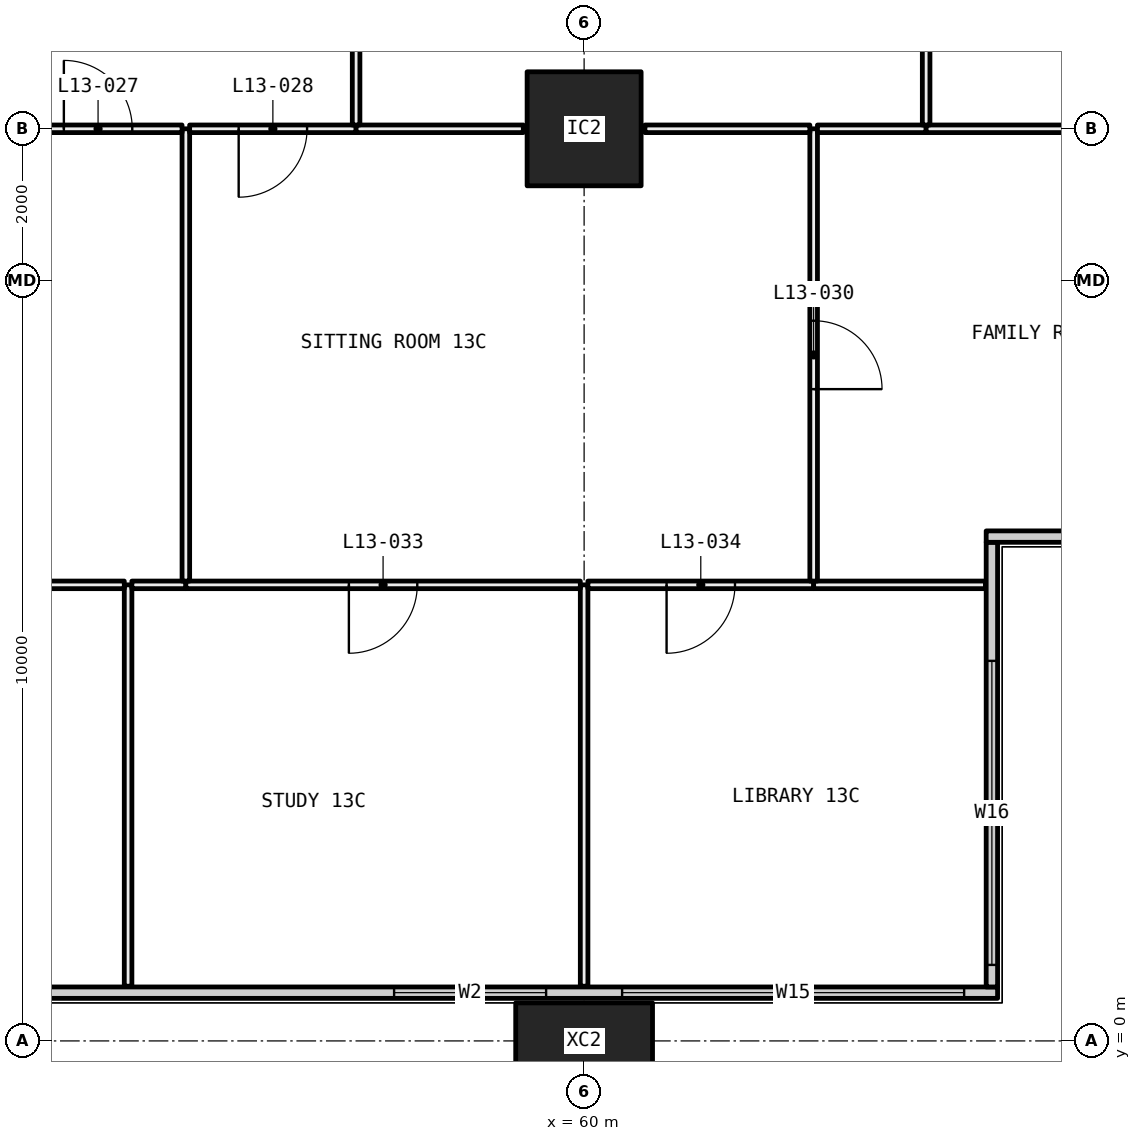
"""IFC4 building model, lengths in metres.
Left out: names, types, materials, properties, quantities, classifications, styles, units other than length and angle.
Written with IfcOpenShell. Run it as: python <this file> out.ifc"""

import sys

from ifc_helpers import new_model, si_unit, direction, frame, frame_2d, origin, origin_2d, place, context, subcontext, project, spatial, rectangle, hollow_rectangle, extrude, element, fill, save


model = new_model("IFC4")
c1 = context("Model", 3, precision=1e-05, world=origin(), true_north=direction((0.0, 1.0)))
c2 = subcontext(c1, "Body", "Model", "MODEL_VIEW")
j1 = project(units=[si_unit("LENGTHUNIT", "METRE"), si_unit("PLANEANGLEUNIT", "RADIAN")], contexts=[c1])
p1 = place(None, origin())
s1 = spatial("IfcSite", under=j1, at=p1, CompositionType="ELEMENT")
p2 = place(p1, origin())
s2 = spatial("IfcBuilding", under=s1, at=p2, CompositionType="ELEMENT")
p3 = place(p2, frame((0.0, 0.0, 57.6)))
s3 = spatial("IfcBuildingStorey", under=s2, at=p3, CompositionType="ELEMENT", Elevation=57.6)
p4 = place(p3, frame((60.0, 0.0, -0.4), z_axis=(0.0, 0.0, 1.0), x_axis=(1.0, 0.0, 0.0)))
e1 = element("IfcColumn", 1, at=p4, inside=s3, PredefinedType="COLUMN", context=c2, shape_type="SweptSolid", body=[
    extrude(hollow_rectangle(XDim=1.8, YDim=1.0, WallThickness=0.07, at=origin_2d()), origin(), (0.0, 0.0, 1.0), 3.45),
])
p5 = place(p3, frame((60.0, 12.0, 0.0), z_axis=(0.0, 0.0, 1.0), x_axis=(1.0, 0.0, 0.0)))
e2 = element("IfcColumn", 2, at=p5, inside=s3, PredefinedType="COLUMN", context=c2, shape_type="SweptSolid", body=[
    extrude(hollow_rectangle(XDim=1.5, YDim=1.5, WallThickness=0.065, at=origin_2d()), origin(), (0.0, 0.0, 1.0), 3.05),
])
p6 = place(p3, frame((6.56, 0.635, 0.0), z_axis=(0.0, 0.0, 1.0), x_axis=(1.0, 0.0, 0.0)))
e3 = element("IfcWall", 3, at=p6, inside=s3, PredefinedType="ELEMENTEDWALL", context=c2, shape_type="SweptSolid", body=[
    extrude(rectangle(XDim=58.88, YDim=0.15, at=frame_2d((29.44, 0.0))), origin(), (0.0, 0.0, 1.0), 3.05),
])
p7 = place(p6, frame((0.44, 0.0, 0.45)))
e4 = element("IfcOpeningElement", 4, at=p7, cuts=e3, PredefinedType="OPENING", context=c2, shape_type="SweptSolid", body=[
    extrude(rectangle(XDim=4.5, YDim=2.55, at=frame_2d((2.25, 1.275))), frame((0.0, 0.085, 0.0), z_axis=(0.0, -1.0, 0.0), x_axis=(1.0, 0.0, 0.0)), (0.0, 0.0, 1.0), 0.17),
])
p8 = place(p6, frame((5.94, 0.0, 0.45)))
e5 = element("IfcOpeningElement", 5, at=p8, cuts=e3, PredefinedType="OPENING", context=c2, shape_type="SweptSolid", body=[
    extrude(rectangle(XDim=3.25, YDim=2.55, at=frame_2d((1.625, 1.275))), frame((0.0, 0.085, 0.0), z_axis=(0.0, -1.0, 0.0), x_axis=(1.0, 0.0, 0.0)), (0.0, 0.0, 1.0), 0.17),
])
p9 = place(p6, frame((13.69, 0.0, 0.45)))
e6 = element("IfcOpeningElement", 6, at=p9, cuts=e3, PredefinedType="OPENING", context=c2, shape_type="SweptSolid", body=[
    extrude(rectangle(XDim=3.25, YDim=2.55, at=frame_2d((1.625, 1.275))), frame((0.0, 0.085, 0.0), z_axis=(0.0, -1.0, 0.0), x_axis=(1.0, 0.0, 0.0)), (0.0, 0.0, 1.0), 0.17),
])
p10 = place(p6, frame((17.94, 0.0, 0.45)))
e7 = element("IfcOpeningElement", 7, at=p10, cuts=e3, PredefinedType="OPENING", context=c2, shape_type="SweptSolid", body=[
    extrude(rectangle(XDim=3.25, YDim=2.55, at=frame_2d((1.625, 1.275))), frame((0.0, 0.085, 0.0), z_axis=(0.0, -1.0, 0.0), x_axis=(1.0, 0.0, 0.0)), (0.0, 0.0, 1.0), 0.17),
])
p11 = place(p6, frame((26.94, 0.0, 0.45)))
e8 = element("IfcOpeningElement", 8, at=p11, cuts=e3, PredefinedType="OPENING", context=c2, shape_type="SweptSolid", body=[
    extrude(rectangle(XDim=2.0, YDim=2.55, at=frame_2d((1.0, 1.275))), frame((0.0, 0.085, 0.0), z_axis=(0.0, -1.0, 0.0), x_axis=(1.0, 0.0, 0.0)), (0.0, 0.0, 1.0), 0.17),
])
p12 = place(p6, frame((29.94, 0.0, 0.45)))
e9 = element("IfcOpeningElement", 9, at=p12, cuts=e3, PredefinedType="OPENING", context=c2, shape_type="SweptSolid", body=[
    extrude(rectangle(XDim=3.25, YDim=2.55, at=frame_2d((1.625, 1.275))), frame((0.0, 0.085, 0.0), z_axis=(0.0, -1.0, 0.0), x_axis=(1.0, 0.0, 0.0)), (0.0, 0.0, 1.0), 0.17),
])
p13 = place(p6, frame((37.69, 0.0, 0.45)))
e10 = element("IfcOpeningElement", 10, at=p13, cuts=e3, PredefinedType="OPENING", context=c2, shape_type="SweptSolid", body=[
    extrude(rectangle(XDim=3.25, YDim=2.55, at=frame_2d((1.625, 1.275))), frame((0.0, 0.085, 0.0), z_axis=(0.0, -1.0, 0.0), x_axis=(1.0, 0.0, 0.0)), (0.0, 0.0, 1.0), 0.17),
])
p14 = place(p6, frame((41.94, 0.0, 0.45)))
e11 = element("IfcOpeningElement", 11, at=p14, cuts=e3, PredefinedType="OPENING", context=c2, shape_type="SweptSolid", body=[
    extrude(rectangle(XDim=3.25, YDim=2.55, at=frame_2d((1.625, 1.275))), frame((0.0, 0.085, 0.0), z_axis=(0.0, -1.0, 0.0), x_axis=(1.0, 0.0, 0.0)), (0.0, 0.0, 1.0), 0.17),
])
p15 = place(p6, frame((50.94, 0.0, 0.45)))
e12 = element("IfcOpeningElement", 12, at=p15, cuts=e3, PredefinedType="OPENING", context=c2, shape_type="SweptSolid", body=[
    extrude(rectangle(XDim=2.0, YDim=2.55, at=frame_2d((1.0, 1.275))), frame((0.0, 0.085, 0.0), z_axis=(0.0, -1.0, 0.0), x_axis=(1.0, 0.0, 0.0)), (0.0, 0.0, 1.0), 0.17),
])
p16 = place(p6, frame((53.94, 0.0, 0.45)))
e13 = element("IfcOpeningElement", 13, at=p16, cuts=e3, PredefinedType="OPENING", context=c2, shape_type="SweptSolid", body=[
    extrude(rectangle(XDim=4.5, YDim=2.55, at=frame_2d((2.25, 1.275))), frame((0.0, 0.085, 0.0), z_axis=(0.0, -1.0, 0.0), x_axis=(1.0, 0.0, 0.0)), (0.0, 0.0, 1.0), 0.17),
])
p17 = place(p3, frame((65.365, 0.71, 0.0), z_axis=(0.0, 0.0, 1.0), x_axis=(0.0, 1.0, 0.0)))
e14 = element("IfcWall", 14, at=p17, inside=s3, PredefinedType="ELEMENTEDWALL", context=c2, shape_type="SweptSolid", body=[
    extrude(rectangle(XDim=5.85, YDim=0.15, at=frame_2d((2.925, 0.0))), origin(), (0.0, 0.0, 1.0), 3.05),
])
p18 = place(p17, frame((0.29, 0.0, 0.45)))
e15 = element("IfcOpeningElement", 15, at=p18, cuts=e14, PredefinedType="OPENING", context=c2, shape_type="SweptSolid", body=[
    extrude(rectangle(XDim=4.0, YDim=2.55, at=frame_2d((2.0, 1.275))), frame((0.0, 0.085, 0.0), z_axis=(0.0, -1.0, 0.0), x_axis=(1.0, 0.0, 0.0)), (0.0, 0.0, 1.0), 0.17),
])
p19 = place(p3, frame((65.29, 6.635, 0.0), z_axis=(0.0, 0.0, 1.0), x_axis=(1.0, 0.0, 0.0)))
e16 = element("IfcWall", 16, at=p19, inside=s3, PredefinedType="ELEMENTEDWALL", context=c2, shape_type="SweptSolid", body=[
    extrude(rectangle(XDim=6.15, YDim=0.15, at=frame_2d((3.075, 0.0))), origin(), (0.0, 0.0, 1.0), 3.05),
])
p20 = place(p19, frame((1.71, 0.0, 0.45)))
e17 = element("IfcOpeningElement", 17, at=p20, cuts=e16, PredefinedType="OPENING", context=c2, shape_type="SweptSolid", body=[
    extrude(rectangle(XDim=4.0, YDim=2.55, at=frame_2d((2.0, 1.275))), frame((0.0, 0.085, 0.0), z_axis=(0.0, -1.0, 0.0), x_axis=(1.0, 0.0, 0.0)), (0.0, 0.0, 1.0), 0.17),
])
p21 = place(p3, frame((54.0, 0.72, 0.0), z_axis=(0.0, 0.0, 1.0), x_axis=(0.0, 1.0, 0.0)))
e18 = element("IfcWall", 18, at=p21, inside=s3, PredefinedType="PARTITIONING", context=c2, shape_type="SweptSolid", body=[
    extrude(rectangle(XDim=5.28, YDim=0.1, at=frame_2d((2.64, 0.0))), origin(), (0.0, 0.0, 1.0), 3.05),
])
p22 = place(p3, frame((53.95, 6.0, 0.0), z_axis=(0.0, 0.0, 1.0), x_axis=(-1.0, 0.0, 0.0)))
e19 = element("IfcWall", 19, at=p22, inside=s3, PredefinedType="PARTITIONING", context=c2, shape_type="SweptSolid", body=[
    extrude(rectangle(XDim=5.9, YDim=0.1, at=frame_2d((2.95, 0.0))), origin(), (0.0, 0.0, 1.0), 2.45),
])
p23 = place(p22, frame((2.5, 0.0, 0.0)))
e20 = element("IfcOpeningElement", 20, at=p23, cuts=e19, PredefinedType="OPENING", context=c2, shape_type="SweptSolid", body=[
    extrude(rectangle(XDim=0.9, YDim=2.1, at=frame_2d((0.45, 1.05))), frame((0.0, 0.06, 0.0), z_axis=(0.0, -1.0, 0.0), x_axis=(1.0, 0.0, 0.0)), (0.0, 0.0, 1.0), 0.12),
])
p24 = place(p3, frame((60.0, 0.72, 0.0), z_axis=(0.0, 0.0, 1.0), x_axis=(0.0, 1.0, 0.0)))
e21 = element("IfcWall", 21, at=p24, inside=s3, PredefinedType="PARTITIONING", context=c2, shape_type="SweptSolid", body=[
    extrude(rectangle(XDim=5.28, YDim=0.1, at=frame_2d((2.64, 0.0))), origin(), (0.0, 0.0, 1.0), 2.45),
])
p25 = place(p3, frame((54.76, 6.0, 0.0), z_axis=(0.0, 0.0, 1.0), x_axis=(-1.0, 0.0, 0.0)))
e22 = element("IfcWall", 22, at=p25, inside=s3, PredefinedType="PARTITIONING", context=c2, shape_type="SweptSolid", body=[
    extrude(rectangle(XDim=0.71, YDim=0.1, at=frame_2d((0.355, 0.0))), origin(), (0.0, 0.0, 1.0), 3.05),
])
p26 = place(p3, frame((59.95, 6.0, 0.0), z_axis=(0.0, 0.0, 1.0), x_axis=(-1.0, 0.0, 0.0)))
e23 = element("IfcWall", 23, at=p26, inside=s3, PredefinedType="PARTITIONING", context=c2, shape_type="SweptSolid", body=[
    extrude(rectangle(XDim=5.19, YDim=0.1, at=frame_2d((2.595, 0.0))), origin(), (0.0, 0.0, 1.0), 2.45),
])
p27 = place(p26, frame((2.145, 0.0, 0.0)))
e24 = element("IfcOpeningElement", 24, at=p27, cuts=e23, PredefinedType="OPENING", context=c2, shape_type="SweptSolid", body=[
    extrude(rectangle(XDim=0.9, YDim=2.1, at=frame_2d((0.45, 1.05))), frame((0.0, 0.06, 0.0), z_axis=(0.0, -1.0, 0.0), x_axis=(1.0, 0.0, 0.0)), (0.0, 0.0, 1.0), 0.12),
])
p28 = place(p3, frame((63.02, 6.0, 0.0), z_axis=(0.0, 0.0, 1.0), x_axis=(-1.0, 0.0, 0.0)))
e25 = element("IfcWall", 25, at=p28, inside=s3, PredefinedType="PARTITIONING", context=c2, shape_type="SweptSolid", body=[
    extrude(rectangle(XDim=2.97, YDim=0.1, at=frame_2d((1.485, 0.0))), origin(), (0.0, 0.0, 1.0), 2.45),
])
p29 = place(p28, frame((1.035, 0.0, 0.0)))
e26 = element("IfcOpeningElement", 26, at=p29, cuts=e25, PredefinedType="OPENING", context=c2, shape_type="SweptSolid", body=[
    extrude(rectangle(XDim=0.9, YDim=2.1, at=frame_2d((0.45, 1.05))), frame((0.0, 0.06, 0.0), z_axis=(0.0, -1.0, 0.0), x_axis=(1.0, 0.0, 0.0)), (0.0, 0.0, 1.0), 0.12),
])
p30 = place(p3, frame((65.28, 6.0, 0.0), z_axis=(0.0, 0.0, 1.0), x_axis=(-1.0, 0.0, 0.0)))
e27 = element("IfcWall", 27, at=p30, inside=s3, PredefinedType="PARTITIONING", context=c2, shape_type="SweptSolid", body=[
    extrude(rectangle(XDim=2.26, YDim=0.1, at=frame_2d((1.13, 0.0))), origin(), (0.0, 0.0, 1.0), 3.05),
])
p31 = place(p3, frame((54.76, 6.05, 0.0), z_axis=(0.0, 0.0, 1.0), x_axis=(0.0, 1.0, 0.0)))
e28 = element("IfcWall", 28, at=p31, inside=s3, PredefinedType="PARTITIONING", context=c2, shape_type="SweptSolid", body=[
    extrude(rectangle(XDim=5.95, YDim=0.1, at=frame_2d((2.975, 0.0))), origin(), (0.0, 0.0, 1.0), 2.45),
])
p32 = place(p3, frame((54.71, 12.0, 0.0), z_axis=(0.0, 0.0, 1.0), x_axis=(-1.0, 0.0, 0.0)))
e29 = element("IfcWall", 29, at=p32, inside=s3, PredefinedType="PARTITIONING", context=c2, shape_type="SweptSolid", body=[
    extrude(rectangle(XDim=2.21, YDim=0.1, at=frame_2d((1.105, 0.0))), origin(), (0.0, 0.0, 1.0), 2.45),
])
p33 = place(p32, frame((0.655, 0.0, 0.0)))
e30 = element("IfcOpeningElement", 30, at=p33, cuts=e29, PredefinedType="OPENING", context=c2, shape_type="SweptSolid", body=[
    extrude(rectangle(XDim=0.9, YDim=2.1, at=frame_2d((0.45, 1.05))), frame((0.0, 0.06, 0.0), z_axis=(0.0, -1.0, 0.0), x_axis=(1.0, 0.0, 0.0)), (0.0, 0.0, 1.0), 0.12),
])
p34 = place(p3, frame((63.02, 6.05, 0.0), z_axis=(0.0, 0.0, 1.0), x_axis=(0.0, 1.0, 0.0)))
e31 = element("IfcWall", 31, at=p34, inside=s3, PredefinedType="PARTITIONING", context=c2, shape_type="SweptSolid", body=[
    extrude(rectangle(XDim=5.95, YDim=0.1, at=frame_2d((2.975, 0.0))), origin(), (0.0, 0.0, 1.0), 2.45),
])
p35 = place(p34, frame((2.525, 0.0, 0.0)))
e32 = element("IfcOpeningElement", 32, at=p35, cuts=e31, PredefinedType="OPENING", context=c2, shape_type="SweptSolid", body=[
    extrude(rectangle(XDim=0.9, YDim=2.1, at=frame_2d((0.45, 1.05))), frame((0.0, 0.06, 0.0), z_axis=(0.0, -1.0, 0.0), x_axis=(1.0, 0.0, 0.0)), (0.0, 0.0, 1.0), 0.12),
])
p36 = place(p3, frame((57.0, 12.0, 0.0), z_axis=(0.0, 0.0, 1.0), x_axis=(-1.0, 0.0, 0.0)))
e33 = element("IfcWall", 33, at=p36, inside=s3, PredefinedType="PARTITIONING", context=c2, shape_type="SweptSolid", body=[
    extrude(rectangle(XDim=2.19, YDim=0.1, at=frame_2d((1.095, 0.0))), origin(), (0.0, 0.0, 1.0), 2.45),
])
p37 = place(p36, frame((0.645, 0.0, 0.0)))
e34 = element("IfcOpeningElement", 34, at=p37, cuts=e33, PredefinedType="OPENING", context=c2, shape_type="SweptSolid", body=[
    extrude(rectangle(XDim=0.9, YDim=2.1, at=frame_2d((0.45, 1.05))), frame((0.0, 0.06, 0.0), z_axis=(0.0, -1.0, 0.0), x_axis=(1.0, 0.0, 0.0)), (0.0, 0.0, 1.0), 0.12),
])
p38 = place(p3, frame((59.2, 12.0, 0.0), z_axis=(0.0, 0.0, 1.0), x_axis=(-1.0, 0.0, 0.0)))
e35 = element("IfcWall", 35, at=p38, inside=s3, PredefinedType="PARTITIONING", context=c2, shape_type="SweptSolid", body=[
    extrude(rectangle(XDim=2.2, YDim=0.1, at=frame_2d((1.1, 0.0))), origin(), (0.0, 0.0, 1.0), 2.45),
])
p39 = place(p3, frame((62.97, 12.0, 0.0), z_axis=(0.0, 0.0, 1.0), x_axis=(-1.0, 0.0, 0.0)))
e36 = element("IfcWall", 36, at=p39, inside=s3, PredefinedType="PARTITIONING", context=c2, shape_type="SweptSolid", body=[
    extrude(rectangle(XDim=2.17, YDim=0.1, at=frame_2d((1.085, 0.0))), origin(), (0.0, 0.0, 1.0), 2.45),
])
p40 = place(p3, frame((64.5, 12.0, 0.0), z_axis=(0.0, 0.0, 1.0), x_axis=(-1.0, 0.0, 0.0)))
e37 = element("IfcWall", 37, at=p40, inside=s3, PredefinedType="PARTITIONING", context=c2, shape_type="SweptSolid", body=[
    extrude(rectangle(XDim=1.43, YDim=0.1, at=frame_2d((0.715, 0.0))), origin(), (0.0, 0.0, 1.0), 2.45),
])
p41 = place(p3, frame((71.28, 12.0, 0.0), z_axis=(0.0, 0.0, 1.0), x_axis=(-1.0, 0.0, 0.0)))
e38 = element("IfcWall", 38, at=p41, inside=s3, PredefinedType="PARTITIONING", context=c2, shape_type="SweptSolid", body=[
    extrude(rectangle(XDim=6.78, YDim=0.1, at=frame_2d((3.39, 0.0))), origin(), (0.0, 0.0, 1.0), 2.45),
])
p42 = place(p41, frame((2.94, 0.0, 0.0)))
e39 = element("IfcOpeningElement", 39, at=p42, cuts=e38, PredefinedType="OPENING", context=c2, shape_type="SweptSolid", body=[
    extrude(rectangle(XDim=0.9, YDim=2.1, at=frame_2d((0.45, 1.05))), frame((0.0, 0.06, 0.0), z_axis=(0.0, -1.0, 0.0), x_axis=(1.0, 0.0, 0.0)), (0.0, 0.0, 1.0), 0.12),
])
p43 = place(p3, frame((57.0, 12.05, 0.0), z_axis=(0.0, 0.0, 1.0), x_axis=(0.0, 1.0, 0.0)))
e40 = element("IfcWall", 40, at=p43, inside=s3, PredefinedType="PARTITIONING", context=c2, shape_type="SweptSolid", body=[
    extrude(rectangle(XDim=5.85, YDim=0.1, at=frame_2d((2.925, 0.0))), origin(), (0.0, 0.0, 1.0), 2.45),
])
p44 = place(p43, frame((2.475, 0.0, 0.0)))
e41 = element("IfcOpeningElement", 41, at=p44, cuts=e40, PredefinedType="OPENING", context=c2, shape_type="SweptSolid", body=[
    extrude(rectangle(XDim=0.9, YDim=2.1, at=frame_2d((0.45, 1.05))), frame((0.0, 0.06, 0.0), z_axis=(0.0, -1.0, 0.0), x_axis=(1.0, 0.0, 0.0)), (0.0, 0.0, 1.0), 0.12),
])
p45 = place(p3, frame((64.5, 12.05, 0.0), z_axis=(0.0, 0.0, 1.0), x_axis=(0.0, 1.0, 0.0)))
e42 = element("IfcWall", 42, at=p45, inside=s3, PredefinedType="PARTITIONING", context=c2, shape_type="SweptSolid", body=[
    extrude(rectangle(XDim=5.85, YDim=0.1, at=frame_2d((2.925, 0.0))), origin(), (0.0, 0.0, 1.0), 2.45),
])
p46 = place(p15, origin())
e43 = element("IfcWindow", 43, at=p46, inside=s3, PartitioningType="SINGLE_PANEL", PredefinedType="WINDOW", context=c2, shape_type="SweptSolid", body=[
    extrude(rectangle(XDim=2.0, YDim=2.55, at=frame_2d((1.0, 1.275))), frame((0.0, 0.03, 0.0), z_axis=(0.0, -1.0, 0.0), x_axis=(1.0, 0.0, 0.0)), (0.0, 0.0, 1.0), 0.06),
])
fill(e12, e43)
p47 = place(p16, origin())
e44 = element("IfcWindow", 44, at=p47, inside=s3, PartitioningType="SINGLE_PANEL", PredefinedType="WINDOW", context=c2, shape_type="SweptSolid", body=[
    extrude(rectangle(XDim=4.5, YDim=2.55, at=frame_2d((2.25, 1.275))), frame((0.0, 0.03, 0.0), z_axis=(0.0, -1.0, 0.0), x_axis=(1.0, 0.0, 0.0)), (0.0, 0.0, 1.0), 0.06),
])
fill(e13, e44)
p48 = place(p18, origin())
e45 = element("IfcWindow", 45, at=p48, inside=s3, PartitioningType="SINGLE_PANEL", PredefinedType="WINDOW", context=c2, shape_type="SweptSolid", body=[
    extrude(rectangle(XDim=4.0, YDim=2.55, at=frame_2d((2.0, 1.275))), frame((0.0, 0.03, 0.0), z_axis=(0.0, -1.0, 0.0), x_axis=(1.0, 0.0, 0.0)), (0.0, 0.0, 1.0), 0.06),
])
fill(e15, e45)
p49 = place(p33, frame((0.9, 0.0, 0.0), x_axis=(-1.0, 0.0, 0.0)))
e46 = element("IfcDoor", 46, at=p49, inside=s3, OperationType="SINGLE_SWING_RIGHT", PredefinedType="DOOR", context=c2, shape_type="SweptSolid", body=[
    extrude(rectangle(XDim=0.9, YDim=2.1, at=frame_2d((0.45, 1.05))), frame((0.0, 0.025, 0.0), z_axis=(0.0, -1.0, 0.0), x_axis=(1.0, 0.0, 0.0)), (0.0, 0.0, 1.0), 0.05),
])
fill(e30, e46)
p50 = place(p37, origin())
e47 = element("IfcDoor", 47, at=p50, inside=s3, OperationType="SINGLE_SWING_LEFT", PredefinedType="DOOR", context=c2, shape_type="SweptSolid", body=[
    extrude(rectangle(XDim=0.9, YDim=2.1, at=frame_2d((0.45, 1.05))), frame((0.0, 0.025, 0.0), z_axis=(0.0, -1.0, 0.0), x_axis=(1.0, 0.0, 0.0)), (0.0, 0.0, 1.0), 0.05),
])
fill(e34, e47)
p51 = place(p35, frame((0.9, 0.0, 0.0), x_axis=(-1.0, 0.0, 0.0)))
e48 = element("IfcDoor", 48, at=p51, inside=s3, OperationType="SINGLE_SWING_LEFT", PredefinedType="DOOR", context=c2, shape_type="SweptSolid", body=[
    extrude(rectangle(XDim=0.9, YDim=2.1, at=frame_2d((0.45, 1.05))), frame((0.0, 0.025, 0.0), z_axis=(0.0, -1.0, 0.0), x_axis=(1.0, 0.0, 0.0)), (0.0, 0.0, 1.0), 0.05),
])
fill(e32, e48)
p52 = place(p27, origin())
e49 = element("IfcDoor", 49, at=p52, inside=s3, OperationType="SINGLE_SWING_LEFT", PredefinedType="DOOR", context=c2, shape_type="SweptSolid", body=[
    extrude(rectangle(XDim=0.9, YDim=2.1, at=frame_2d((0.45, 1.05))), frame((0.0, 0.025, 0.0), z_axis=(0.0, -1.0, 0.0), x_axis=(1.0, 0.0, 0.0)), (0.0, 0.0, 1.0), 0.05),
])
fill(e24, e49)
p53 = place(p29, origin())
e50 = element("IfcDoor", 50, at=p53, inside=s3, OperationType="SINGLE_SWING_LEFT", PredefinedType="DOOR", context=c2, shape_type="SweptSolid", body=[
    extrude(rectangle(XDim=0.9, YDim=2.1, at=frame_2d((0.45, 1.05))), frame((0.0, 0.025, 0.0), z_axis=(0.0, -1.0, 0.0), x_axis=(1.0, 0.0, 0.0)), (0.0, 0.0, 1.0), 0.05),
])
fill(e26, e50)
save(model, sys.argv[1])
